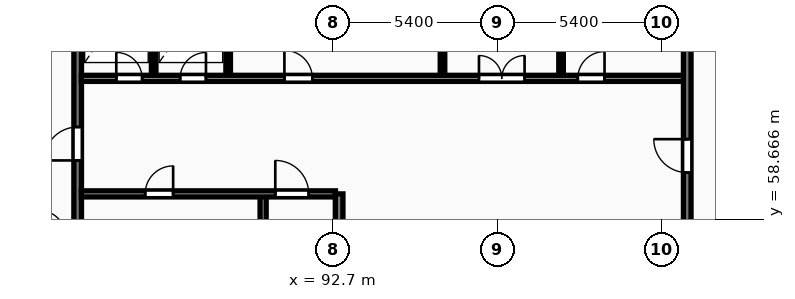
"""IFC4 building model, lengths in metres.
Left out: names, types, materials, properties, quantities, classifications, styles, units other than length and angle.
Written with IfcOpenShell. Run it as: python <this file> out.ifc"""

import sys

from ifc_helpers import new_model, si_unit, direction, frame, frame_2d, origin, place, context, subcontext, project, spatial, rectangle, extrude, element, fill, save


model = new_model("IFC4")
c1 = context("Model", 3, precision=1e-05, world=origin(), true_north=direction((0.0, 1.0)))
c2 = subcontext(c1, "Body", "Model", "MODEL_VIEW")
j1 = project(units=[si_unit("LENGTHUNIT", "METRE"), si_unit("PLANEANGLEUNIT", "RADIAN")], contexts=[c1])
p1 = place(None, origin())
s1 = spatial("IfcSite", under=j1, at=p1, CompositionType="ELEMENT")
p2 = place(p1, origin())
s2 = spatial("IfcBuilding", under=s1, at=p2, CompositionType="ELEMENT")
p3 = place(p2, frame((0.0, 0.0, 142.9)))
s3 = spatial("IfcBuildingStorey", under=s2, at=p3, CompositionType="ELEMENT", Elevation=142.9)
p4 = place(p3, frame((84.3, 55.4, 0.0), z_axis=(0.0, 0.0, 1.0), x_axis=(0.0, 1.0, 0.0)))
e1 = element("IfcWall", 1, at=p4, inside=s3, PredefinedType="SHEAR", context=c2, shape_type="SweptSolid", body=[
    extrude(rectangle(XDim=11.6, YDim=0.25, at=frame_2d((5.8, 0.0))), origin(), (0.0, 0.0, 1.0), 3.6),
])
p5 = place(p4, frame((5.2, 0.0, 0.0)))
e2 = element("IfcOpeningElement", 2, at=p5, cuts=e1, PredefinedType="OPENING", context=c2, shape_type="SweptSolid", body=[
    extrude(rectangle(XDim=1.1, YDim=2.1, at=frame_2d((0.55, 1.05))), frame((0.0, 0.135, 0.0), z_axis=(0.0, -1.0, 0.0), x_axis=(1.0, 0.0, 0.0)), (0.0, 0.0, 1.0), 0.27),
])
p6 = place(p3, frame((90.4, 55.4, 0.0), z_axis=(0.0, 0.0, 1.0), x_axis=(0.0, 1.0, 0.0)))
e3 = element("IfcWall", 3, at=p6, inside=s3, PredefinedType="PARTITIONING", context=c2, shape_type="SweptSolid", body=[
    extrude(rectangle(XDim=4.1, YDim=0.2, at=frame_2d((2.05, 0.0))), origin(), (0.0, 0.0, 1.0), 3.31),
])
p7 = place(p3, frame((84.42, 59.5, 0.0), z_axis=(0.0, 0.0, 1.0), x_axis=(1.0, 0.0, 0.0)))
e4 = element("IfcWall", 4, at=p7, inside=s3, PredefinedType="PARTITIONING", context=c2, shape_type="SweptSolid", body=[
    extrude(rectangle(XDim=8.36, YDim=0.2, at=frame_2d((4.18, 0.0))), origin(), (0.0, 0.0, 1.0), 3.31),
])
p8 = place(p7, frame((2.1, 0.0, 0.0)))
e5 = element("IfcOpeningElement", 5, at=p8, cuts=e4, PredefinedType="OPENING", context=c2, shape_type="SweptSolid", body=[
    extrude(rectangle(XDim=0.92, YDim=2.08, at=frame_2d((0.46, 1.04))), frame((0.0, 0.11, 0.0), z_axis=(0.0, -1.0, 0.0), x_axis=(1.0, 0.0, 0.0)), (0.0, 0.0, 1.0), 0.22),
])
p9 = place(p7, frame((6.38, 0.0, 0.0)))
e6 = element("IfcOpeningElement", 6, at=p9, cuts=e4, PredefinedType="OPENING", context=c2, shape_type="SweptSolid", body=[
    extrude(rectangle(XDim=1.1, YDim=2.1, at=frame_2d((0.55, 1.05))), frame((0.0, 0.11, 0.0), z_axis=(0.0, -1.0, 0.0), x_axis=(1.0, 0.0, 0.0)), (0.0, 0.0, 1.0), 0.22),
])
p10 = place(p3, frame((92.9, 55.4, 0.0), z_axis=(0.0, 0.0, 1.0), x_axis=(0.0, 1.0, 0.0)))
e7 = element("IfcWall", 7, at=p10, inside=s3, PredefinedType="SHEAR", context=c2, shape_type="SweptSolid", body=[
    extrude(rectangle(XDim=4.1, YDim=0.25, at=frame_2d((2.05, 0.0))), origin(), (0.0, 0.0, 1.0), 3.6),
])
for number, where, z_axis, x_axis in (
    (8, (86.8, 63.4, 0.0), (0.0, 0.0, 1.0), (0.0, 1.0, 0.0)),
    (9, (89.25, 63.4, 0.0), (0.0, 0.0, 1.0), (0.0, 1.0, 0.0)),
    (10, (96.3, 63.4, 0.0), (0.0, 0.0, 1.0), (0.0, 1.0, 0.0)),
    (11, (100.2, 63.4, 0.0), (0.0, 0.0, 1.0), (0.0, 1.0, 0.0)),
):
    element("IfcWall", number, at=place(p3, frame(where, z_axis=z_axis, x_axis=x_axis)), inside=s3, PredefinedType="PARTITIONING", context=c2, shape_type="SweptSolid", body=[
        extrude(rectangle(XDim=3.6, YDim=0.15, at=frame_2d((1.8, 0.0))), origin(), (0.0, 0.0, 1.0), 3.31),
    ])
p11 = place(p3, frame((84.42, 63.3, 0.0), z_axis=(0.0, 0.0, 1.0), x_axis=(1.0, 0.0, 0.0)))
e12 = element("IfcWall", 12, at=p11, inside=s3, PredefinedType="PARTITIONING", context=c2, shape_type="SweptSolid", body=[
    extrude(rectangle(XDim=19.83, YDim=0.2, at=frame_2d((9.915, 0.0))), origin(), (0.0, 0.0, 1.0), 3.31),
])
p12 = place(p11, frame((1.15, 0.0, 0.0)))
e13 = element("IfcOpeningElement", 13, at=p12, cuts=e12, PredefinedType="OPENING", context=c2, shape_type="SweptSolid", body=[
    extrude(rectangle(XDim=0.85, YDim=2.05, at=frame_2d((0.425, 1.025))), frame((0.0, 0.11, 0.0), z_axis=(0.0, -1.0, 0.0), x_axis=(1.0, 0.0, 0.0)), (0.0, 0.0, 1.0), 0.22),
])
p13 = place(p11, frame((3.25, 0.0, 0.0)))
e14 = element("IfcOpeningElement", 14, at=p13, cuts=e12, PredefinedType="OPENING", context=c2, shape_type="SweptSolid", body=[
    extrude(rectangle(XDim=0.85, YDim=2.05, at=frame_2d((0.425, 1.025))), frame((0.0, 0.11, 0.0), z_axis=(0.0, -1.0, 0.0), x_axis=(1.0, 0.0, 0.0)), (0.0, 0.0, 1.0), 0.22),
])
p14 = place(p11, frame((13.08, 0.0, 0.0)))
e15 = element("IfcOpeningElement", 15, at=p14, cuts=e12, PredefinedType="OPENING", context=c2, shape_type="SweptSolid", body=[
    extrude(rectangle(XDim=1.5, YDim=2.2, at=frame_2d((0.75, 1.1))), frame((0.0, 0.11, 0.0), z_axis=(0.0, -1.0, 0.0), x_axis=(1.0, 0.0, 0.0)), (0.0, 0.0, 1.0), 0.22),
])
p15 = place(p11, frame((6.68, 0.0, 0.0)))
e16 = element("IfcOpeningElement", 16, at=p15, cuts=e12, PredefinedType="OPENING", context=c2, shape_type="SweptSolid", body=[
    extrude(rectangle(XDim=0.92, YDim=2.08, at=frame_2d((0.46, 1.04))), frame((0.0, 0.11, 0.0), z_axis=(0.0, -1.0, 0.0), x_axis=(1.0, 0.0, 0.0)), (0.0, 0.0, 1.0), 0.22),
])
p16 = place(p11, frame((16.33, 0.0, 0.0)))
e17 = element("IfcOpeningElement", 17, at=p16, cuts=e12, PredefinedType="OPENING", context=c2, shape_type="SweptSolid", body=[
    extrude(rectangle(XDim=0.88, YDim=2.06, at=frame_2d((0.44, 1.03))), frame((0.0, 0.11, 0.0), z_axis=(0.0, -1.0, 0.0), x_axis=(1.0, 0.0, 0.0)), (0.0, 0.0, 1.0), 0.22),
])
p17 = place(p3, frame((104.35, 58.4, 0.0), z_axis=(0.0, 0.0, 1.0), x_axis=(0.0, 1.0, 0.0)))
e18 = element("IfcWall", 18, at=p17, inside=s3, PredefinedType="SHEAR", context=c2, shape_type="SweptSolid", body=[
    extrude(rectangle(XDim=8.6, YDim=0.25, at=frame_2d((4.3, 0.0))), origin(), (0.0, 0.0, 1.0), 3.6),
])
p18 = place(p17, frame((1.8, 0.0, 0.0)))
e19 = element("IfcOpeningElement", 19, at=p18, cuts=e18, PredefinedType="OPENING", context=c2, shape_type="SweptSolid", body=[
    extrude(rectangle(XDim=1.1, YDim=2.1, at=frame_2d((0.55, 1.05))), frame((0.0, 0.135, 0.0), z_axis=(0.0, -1.0, 0.0), x_axis=(1.0, 0.0, 0.0)), (0.0, 0.0, 1.0), 0.27),
])
p19 = place(p5, origin())
e20 = element("IfcDoor", 20, at=p19, inside=s3, OperationType="SINGLE_SWING_LEFT", PredefinedType="DOOR", context=c2, shape_type="SweptSolid", body=[
    extrude(rectangle(XDim=1.1, YDim=2.1, at=frame_2d((0.55, 1.05))), frame((0.0, 0.025, 0.0), z_axis=(0.0, -1.0, 0.0), x_axis=(1.0, 0.0, 0.0)), (0.0, 0.0, 1.0), 0.05),
])
fill(e2, e20)
p20 = place(p8, origin())
e21 = element("IfcDoor", 21, at=p20, inside=s3, OperationType="SINGLE_SWING_RIGHT", PredefinedType="DOOR", context=c2, shape_type="SweptSolid", body=[
    extrude(rectangle(XDim=0.92, YDim=2.08, at=frame_2d((0.46, 1.04))), frame((0.0, 0.025, 0.0), z_axis=(0.0, -1.0, 0.0), x_axis=(1.0, 0.0, 0.0)), (0.0, 0.0, 1.0), 0.05),
])
fill(e5, e21)
p21 = place(p9, origin())
e22 = element("IfcDoor", 22, at=p21, inside=s3, OperationType="SINGLE_SWING_LEFT", PredefinedType="DOOR", context=c2, shape_type="SweptSolid", body=[
    extrude(rectangle(XDim=1.1, YDim=2.1, at=frame_2d((0.55, 1.05))), frame((0.0, 0.025, 0.0), z_axis=(0.0, -1.0, 0.0), x_axis=(1.0, 0.0, 0.0)), (0.0, 0.0, 1.0), 0.05),
])
fill(e6, e22)
p22 = place(p12, origin())
e23 = element("IfcDoor", 23, at=p22, inside=s3, OperationType="SINGLE_SWING_LEFT", PredefinedType="DOOR", context=c2, shape_type="SweptSolid", body=[
    extrude(rectangle(XDim=0.85, YDim=2.05, at=frame_2d((0.425, 1.025))), frame((0.0, 0.025, 0.0), z_axis=(0.0, -1.0, 0.0), x_axis=(1.0, 0.0, 0.0)), (0.0, 0.0, 1.0), 0.05),
])
fill(e13, e23)
p23 = place(p13, origin())
e24 = element("IfcDoor", 24, at=p23, inside=s3, OperationType="SINGLE_SWING_RIGHT", PredefinedType="DOOR", context=c2, shape_type="SweptSolid", body=[
    extrude(rectangle(XDim=0.85, YDim=2.05, at=frame_2d((0.425, 1.025))), frame((0.0, 0.025, 0.0), z_axis=(0.0, -1.0, 0.0), x_axis=(1.0, 0.0, 0.0)), (0.0, 0.0, 1.0), 0.05),
])
fill(e14, e24)
p24 = place(p14, origin())
e25 = element("IfcDoor", 25, at=p24, inside=s3, OperationType="DOUBLE_DOOR_SINGLE_SWING", PredefinedType="DOOR", context=c2, shape_type="SweptSolid", body=[
    extrude(rectangle(XDim=1.5, YDim=2.2, at=frame_2d((0.75, 1.1))), frame((0.0, 0.025, 0.0), z_axis=(0.0, -1.0, 0.0), x_axis=(1.0, 0.0, 0.0)), (0.0, 0.0, 1.0), 0.05),
])
fill(e15, e25)
p25 = place(p15, origin())
e26 = element("IfcDoor", 26, at=p25, inside=s3, OperationType="SINGLE_SWING_LEFT", PredefinedType="DOOR", context=c2, shape_type="SweptSolid", body=[
    extrude(rectangle(XDim=0.92, YDim=2.08, at=frame_2d((0.46, 1.04))), frame((0.0, 0.025, 0.0), z_axis=(0.0, -1.0, 0.0), x_axis=(1.0, 0.0, 0.0)), (0.0, 0.0, 1.0), 0.05),
])
fill(e16, e26)
p26 = place(p16, origin())
e27 = element("IfcDoor", 27, at=p26, inside=s3, OperationType="SINGLE_SWING_RIGHT", PredefinedType="DOOR", context=c2, shape_type="SweptSolid", body=[
    extrude(rectangle(XDim=0.88, YDim=2.06, at=frame_2d((0.44, 1.03))), frame((0.0, 0.025, 0.0), z_axis=(0.0, -1.0, 0.0), x_axis=(1.0, 0.0, 0.0)), (0.0, 0.0, 1.0), 0.05),
])
fill(e17, e27)
p27 = place(p18, origin())
e28 = element("IfcDoor", 28, at=p27, inside=s3, OperationType="SINGLE_SWING_RIGHT", PredefinedType="DOOR", context=c2, shape_type="SweptSolid", body=[
    extrude(rectangle(XDim=1.1, YDim=2.1, at=frame_2d((0.55, 1.05))), frame((0.0, 0.025, 0.0), z_axis=(0.0, -1.0, 0.0), x_axis=(1.0, 0.0, 0.0)), (0.0, 0.0, 1.0), 0.05),
])
fill(e19, e28)
save(model, sys.argv[1])
